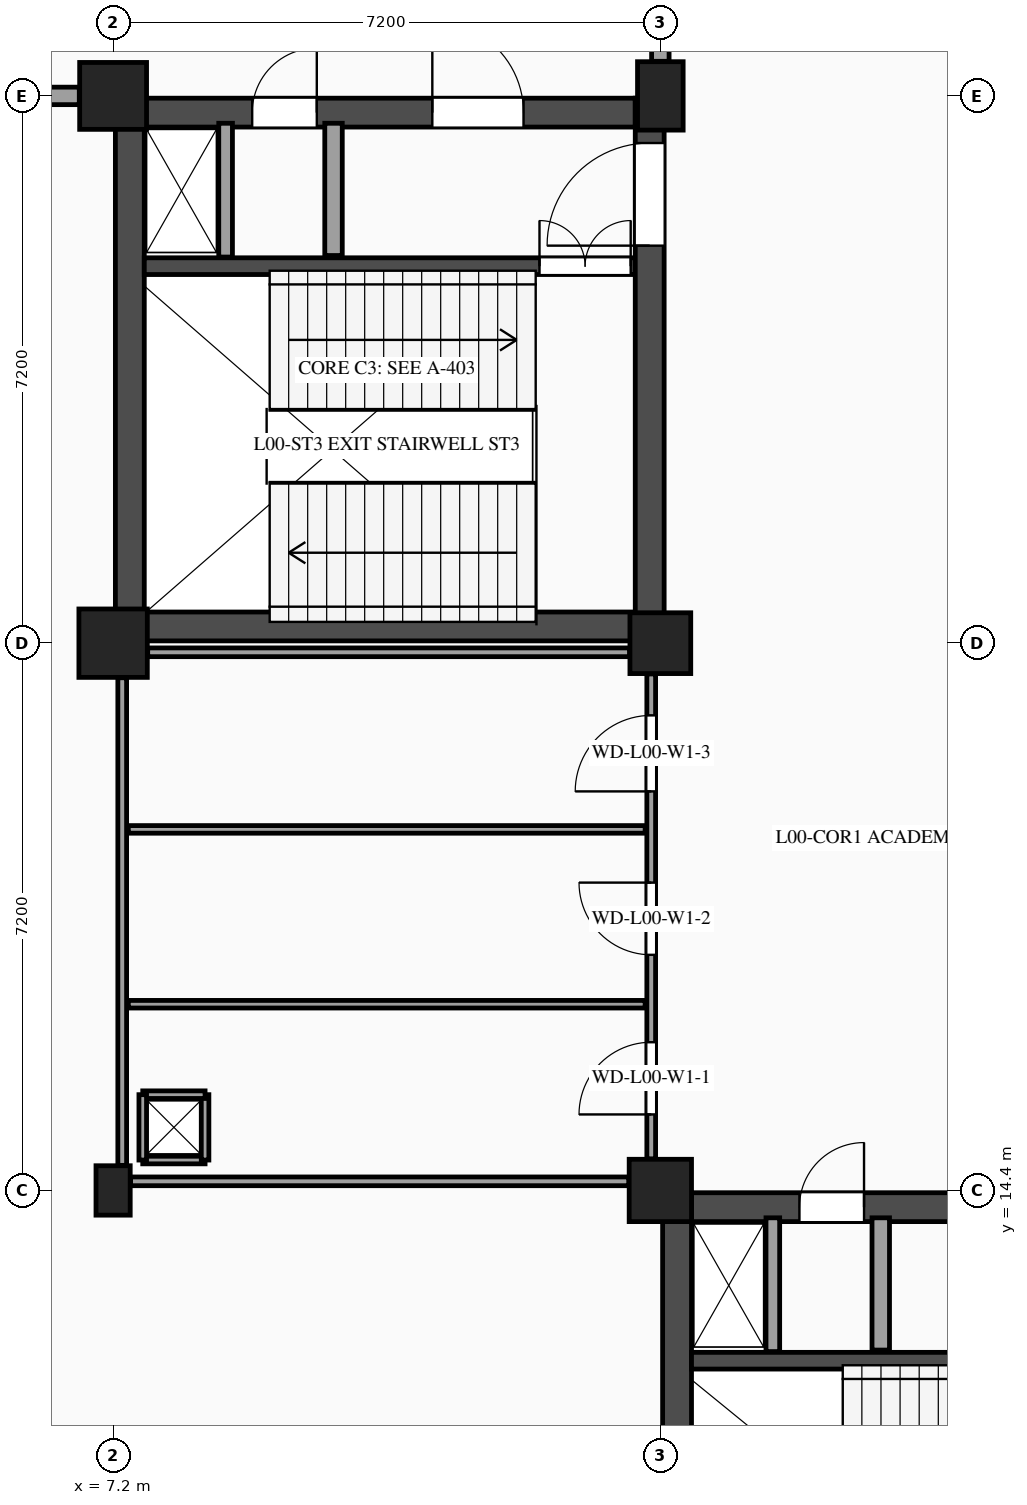
"""IFC4 building model, lengths in metres.
Left out: names, types, materials, properties, quantities, classifications, styles, units other than length and angle.
Written with IfcOpenShell. Run it as: python <this file> out.ifc"""

import sys

from ifc_helpers import new_model, si_unit, direction, frame, frame_2d, origin, origin_2d, place, context, subcontext, project, spatial, rectangle, extrude, element, fill, save


model = new_model("IFC4")
c1 = context("Model", 3, precision=1e-05, world=origin(), true_north=direction((0.0, 1.0)))
c2 = subcontext(c1, "Body", "Model", "MODEL_VIEW")
j1 = project(units=[si_unit("LENGTHUNIT", "METRE"), si_unit("PLANEANGLEUNIT", "RADIAN")], contexts=[c1])
p1 = place(None, origin())
s1 = spatial("IfcSite", under=j1, at=p1, CompositionType="ELEMENT")
p2 = place(p1, origin())
s2 = spatial("IfcBuilding", under=s1, at=p2, CompositionType="ELEMENT")
p3 = place(p2, origin())
s3 = spatial("IfcBuildingStorey", under=s2, at=p3, CompositionType="ELEMENT", Elevation=0.0)
p4 = place(p3, frame((7.2, 14.4, 0.0), z_axis=(0.0, 0.0, 1.0), x_axis=(1.0, 0.0, 0.0)))
e1 = element("IfcColumn", 1, at=p4, inside=s3, PredefinedType="PILASTER", context=c2, shape_type="SweptSolid", body=[
    extrude(rectangle(XDim=0.45, YDim=0.65, at=origin_2d()), origin(), (0.0, 0.0, 1.0), 5.4),
])
p5 = place(p3, frame((7.2, 21.6, 0.0), z_axis=(0.0, 0.0, 1.0), x_axis=(1.0, 0.0, 0.0)))
e2 = element("IfcColumn", 2, at=p5, inside=s3, PredefinedType="COLUMN", context=c2, shape_type="SweptSolid", body=[
    extrude(rectangle(XDim=0.9, YDim=0.9, at=origin_2d()), origin(), (0.0, 0.0, 1.0), 5.4),
])
p6 = place(p3, frame((7.2, 28.8, 0.0), z_axis=(0.0, 0.0, 1.0), x_axis=(1.0, 0.0, 0.0)))
e3 = element("IfcColumn", 3, at=p6, inside=s3, PredefinedType="COLUMN", context=c2, shape_type="SweptSolid", body=[
    extrude(rectangle(XDim=0.88, YDim=0.88, at=origin_2d()), origin(), (0.0, 0.0, 1.0), 5.4),
])
p7 = place(p3, frame((14.4, 14.4, 0.0), z_axis=(0.0, 0.0, 1.0), x_axis=(1.0, 0.0, 0.0)))
e4 = element("IfcColumn", 4, at=p7, inside=s3, PredefinedType="COLUMN", context=c2, shape_type="SweptSolid", body=[
    extrude(rectangle(XDim=0.82, YDim=0.82, at=origin_2d()), origin(), (0.0, 0.0, 1.0), 5.4),
])
p8 = place(p3, frame((14.4, 21.6, 0.0), z_axis=(0.0, 0.0, 1.0), x_axis=(1.0, 0.0, 0.0)))
e5 = element("IfcColumn", 5, at=p8, inside=s3, PredefinedType="COLUMN", context=c2, shape_type="SweptSolid", body=[
    extrude(rectangle(XDim=0.8, YDim=0.8, at=origin_2d()), origin(), (0.0, 0.0, 1.0), 5.4),
])
p9 = place(p3, frame((14.4, 28.8, 0.0), z_axis=(0.0, 0.0, 1.0), x_axis=(1.0, 0.0, 0.0)))
e6 = element("IfcColumn", 6, at=p9, inside=s3, PredefinedType="COLUMN", context=c2, shape_type="SweptSolid", body=[
    extrude(rectangle(XDim=0.6, YDim=0.9, at=origin_2d()), origin(), (0.0, 0.0, 1.0), 5.4),
])
p10 = place(p3, frame((14.62, 14.37, 0.0), z_axis=(0.0, 0.0, 1.0), x_axis=(0.0, -1.0, 0.0)))
e7 = element("IfcWall", 7, at=p10, inside=s3, PredefinedType="SHEAR", context=c2, shape_type="SweptSolid", body=[
    extrude(rectangle(XDim=7.14, YDim=0.38, at=frame_2d((3.57, 0.0))), origin(), (0.0, 0.0, 1.0), 5.09),
])
p11 = place(p3, frame((14.81, 14.18, 0.0), z_axis=(0.0, 0.0, 1.0), x_axis=(1.0, 0.0, 0.0)))
e8 = element("IfcWall", 8, at=p11, inside=s3, PredefinedType="SHEAR", context=c2, shape_type="SweptSolid", body=[
    extrude(rectangle(XDim=6.6, YDim=0.38, at=frame_2d((3.3, 0.0))), origin(), (0.0, 0.0, 1.0), 5.09),
])
p12 = place(p11, frame((1.42, 0.0, 0.0)))
e9 = element("IfcOpeningElement", 9, at=p12, cuts=e8, PredefinedType="OPENING", context=c2, shape_type="SweptSolid", body=[
    extrude(rectangle(XDim=0.85, YDim=2.1, at=frame_2d((0.425, 1.05))), frame((0.0, 0.2, 0.0), z_axis=(0.0, -1.0, 0.0), x_axis=(1.0, 0.0, 0.0)), (0.0, 0.0, 1.0), 0.4),
])
p13 = place(p11, frame((3.4, 0.0, 0.0)))
e10 = element("IfcOpeningElement", 10, at=p13, cuts=e8, PredefinedType="OPENING", context=c2, shape_type="SweptSolid", body=[
    extrude(rectangle(XDim=0.95, YDim=2.15, at=frame_2d((0.475, 1.075))), frame((0.0, 0.2, 0.0), z_axis=(0.0, -1.0, 0.0), x_axis=(1.0, 0.0, 0.0)), (0.0, 0.0, 1.0), 0.4),
])
p14 = place(p3, frame((14.81, 12.16, 0.0), z_axis=(0.0, 0.0, 1.0), x_axis=(1.0, 0.0, 0.0)))
e11 = element("IfcWall", 11, at=p14, inside=s3, PredefinedType="SHEAR", context=c2, shape_type="SweptSolid", body=[
    extrude(rectangle(XDim=6.6, YDim=0.22, at=frame_2d((3.3, 0.0))), origin(), (0.0, 0.0, 1.0), 5.09),
])
p15 = place(p3, frame((17.3, 12.3, 0.0), z_axis=(0.0, 0.0, 1.0), x_axis=(0.0, 1.0, 0.0)))
e12 = element("IfcWall", 12, at=p15, inside=s3, PredefinedType="PARTITIONING", context=c2, shape_type="SweptSolid", body=[
    extrude(rectangle(XDim=1.74, YDim=0.23, at=frame_2d((0.87, 0.0))), origin(), (0.0, 0.0, 1.0), 5.09),
])
p16 = place(p3, frame((15.88, 12.28, 0.0), z_axis=(0.0, 0.0, 1.0), x_axis=(0.0, 1.0, 0.0)))
e13 = element("IfcWall", 13, at=p16, inside=s3, PredefinedType="PARTITIONING", context=c2, shape_type="SweptSolid", body=[
    extrude(rectangle(XDim=1.76, YDim=0.18, at=frame_2d((0.88, 0.0))), origin(), (0.0, 0.0, 1.0), 5.09),
])
p17 = place(p3, frame((7.61, 21.82, 0.0), z_axis=(0.0, 0.0, 1.0), x_axis=(1.0, 0.0, 0.0)))
e14 = element("IfcWall", 14, at=p17, inside=s3, PredefinedType="SHEAR", context=c2, shape_type="SweptSolid", body=[
    extrude(rectangle(XDim=6.46, YDim=0.38, at=frame_2d((3.23, 0.0))), origin(), (0.0, 0.0, 1.0), 5.09),
])
p18 = place(p3, frame((7.42, 28.77, 0.0), z_axis=(0.0, 0.0, 1.0), x_axis=(0.0, -1.0, 0.0)))
e15 = element("IfcWall", 15, at=p18, inside=s3, PredefinedType="SHEAR", context=c2, shape_type="SweptSolid", body=[
    extrude(rectangle(XDim=7.14, YDim=0.38, at=frame_2d((3.57, 0.0))), origin(), (0.0, 0.0, 1.0), 5.09),
])
p19 = place(p3, frame((7.61, 28.58, 0.0), z_axis=(0.0, 0.0, 1.0), x_axis=(1.0, 0.0, 0.0)))
e16 = element("IfcWall", 16, at=p19, inside=s3, PredefinedType="SHEAR", context=c2, shape_type="SweptSolid", body=[
    extrude(rectangle(XDim=6.46, YDim=0.38, at=frame_2d((3.23, 0.0))), origin(), (0.0, 0.0, 1.0), 5.09),
])
p20 = place(p19, frame((1.42, 0.0, 0.0)))
e17 = element("IfcOpeningElement", 17, at=p20, cuts=e16, PredefinedType="OPENING", context=c2, shape_type="SweptSolid", body=[
    extrude(rectangle(XDim=0.85, YDim=2.1, at=frame_2d((0.425, 1.05))), frame((0.0, 0.2, 0.0), z_axis=(0.0, -1.0, 0.0), x_axis=(1.0, 0.0, 0.0)), (0.0, 0.0, 1.0), 0.4),
])
p21 = place(p19, frame((3.79, 0.0, 0.0)))
e18 = element("IfcOpeningElement", 18, at=p21, cuts=e16, PredefinedType="OPENING", context=c2, shape_type="SweptSolid", body=[
    extrude(rectangle(XDim=1.2, YDim=2.2, at=frame_2d((0.6, 1.1))), frame((0.0, 0.2, 0.0), z_axis=(0.0, -1.0, 0.0), x_axis=(1.0, 0.0, 0.0)), (0.0, 0.0, 1.0), 0.4),
])
p22 = place(p3, frame((7.61, 26.56, 0.0), z_axis=(0.0, 0.0, 1.0), x_axis=(1.0, 0.0, 0.0)))
e19 = element("IfcWall", 19, at=p22, inside=s3, PredefinedType="SHEAR", context=c2, shape_type="SweptSolid", body=[
    extrude(rectangle(XDim=6.46, YDim=0.22, at=frame_2d((3.23, 0.0))), origin(), (0.0, 0.0, 1.0), 5.09),
])
p23 = place(p22, frame((5.2, 0.0, 0.0)))
e20 = element("IfcOpeningElement", 20, at=p23, cuts=e19, PredefinedType="OPENING", context=c2, shape_type="SweptSolid", body=[
    extrude(rectangle(XDim=1.2, YDim=2.2, at=frame_2d((0.6, 1.1))), frame((0.0, 0.12, 0.0), z_axis=(0.0, -1.0, 0.0), x_axis=(1.0, 0.0, 0.0)), (0.0, 0.0, 1.0), 0.24),
])
p24 = place(p3, frame((10.1, 26.7, 0.0), z_axis=(0.0, 0.0, 1.0), x_axis=(0.0, 1.0, 0.0)))
e21 = element("IfcWall", 21, at=p24, inside=s3, PredefinedType="PARTITIONING", context=c2, shape_type="SweptSolid", body=[
    extrude(rectangle(XDim=1.74, YDim=0.23, at=frame_2d((0.87, 0.0))), origin(), (0.0, 0.0, 1.0), 5.09),
])
p25 = place(p3, frame((8.68, 26.68, 0.0), z_axis=(0.0, 0.0, 1.0), x_axis=(0.0, 1.0, 0.0)))
e22 = element("IfcWall", 22, at=p25, inside=s3, PredefinedType="PARTITIONING", context=c2, shape_type="SweptSolid", body=[
    extrude(rectangle(XDim=1.76, YDim=0.18, at=frame_2d((0.88, 0.0))), origin(), (0.0, 0.0, 1.0), 5.09),
])
p26 = place(p3, frame((14.26, 21.63, 0.0), z_axis=(0.0, 0.0, 1.0), x_axis=(0.0, 1.0, 0.0)))
e23 = element("IfcWall", 23, at=p26, inside=s3, PredefinedType="SHEAR", context=c2, shape_type="SweptSolid", body=[
    extrude(rectangle(XDim=7.14, YDim=0.38, at=frame_2d((3.57, 0.0))), origin(), (0.0, 0.0, 1.0), 5.09),
])
p27 = place(p26, frame((5.2, 0.0, 0.0)))
e24 = element("IfcOpeningElement", 24, at=p27, cuts=e23, PredefinedType="OPENING", context=c2, shape_type="SweptSolid", body=[
    extrude(rectangle(XDim=1.35, YDim=2.15, at=frame_2d((0.675, 1.075))), frame((0.0, 0.2, 0.0), z_axis=(0.0, -1.0, 0.0), x_axis=(1.0, 0.0, 0.0)), (0.0, 0.0, 1.0), 0.4),
])
p28 = place(p3, frame((7.43, 14.52, 0.0), z_axis=(0.0, 0.0, 1.0), x_axis=(1.0, 0.0, 0.0)))
e25 = element("IfcWall", 25, at=p28, inside=s3, PredefinedType="PARTITIONING", context=c2, shape_type="SweptSolid", body=[
    extrude(rectangle(XDim=6.555, YDim=0.115, at=frame_2d((3.278, 0.0))), origin(), (0.0, 0.0, 1.0), 4.34),
])
p29 = place(p3, frame((7.655, 21.48, 0.0), z_axis=(0.0, 0.0, 1.0), x_axis=(1.0, 0.0, 0.0)))
e26 = element("IfcWall", 26, at=p29, inside=s3, PredefinedType="PARTITIONING", context=c2, shape_type="SweptSolid", body=[
    extrude(rectangle(XDim=6.34, YDim=0.115, at=frame_2d((3.17, 0.0))), origin(), (0.0, 0.0, 1.0), 4.34),
])
p30 = place(p3, frame((7.32, 14.73, 0.0), z_axis=(0.0, 0.0, 1.0), x_axis=(0.0, 1.0, 0.0)))
e27 = element("IfcWall", 27, at=p30, inside=s3, PredefinedType="PARTITIONING", context=c2, shape_type="SweptSolid", body=[
    extrude(rectangle(XDim=6.415, YDim=0.115, at=frame_2d((3.208, 0.0))), origin(), (0.0, 0.0, 1.0), 4.405),
])
p31 = place(p3, frame((14.28, 14.815, 0.0), z_axis=(0.0, 0.0, 1.0), x_axis=(0.0, 1.0, 0.0)))
e28 = element("IfcWall", 28, at=p31, inside=s3, PredefinedType="PARTITIONING", context=c2, shape_type="SweptSolid", body=[
    extrude(rectangle(XDim=6.38, YDim=0.115, at=frame_2d((3.19, 0.0))), origin(), (0.0, 0.0, 1.0), 4.405),
])
p32 = place(p31, frame((0.585, 0.0, 0.0)))
e29 = element("IfcOpeningElement", 29, at=p32, cuts=e28, PredefinedType="OPENING", context=c2, shape_type="SweptSolid", body=[
    extrude(rectangle(XDim=0.95, YDim=2.1, at=frame_2d((0.475, 1.05))), frame((0.0, 0.067, 0.0), z_axis=(0.0, -1.0, 0.0), x_axis=(1.0, 0.0, 0.0)), (0.0, 0.0, 1.0), 0.135),
])
p33 = place(p31, frame((2.685, 0.0, 0.0)))
e30 = element("IfcOpeningElement", 30, at=p33, cuts=e28, PredefinedType="OPENING", context=c2, shape_type="SweptSolid", body=[
    extrude(rectangle(XDim=0.95, YDim=2.1, at=frame_2d((0.475, 1.05))), frame((0.0, 0.067, 0.0), z_axis=(0.0, -1.0, 0.0), x_axis=(1.0, 0.0, 0.0)), (0.0, 0.0, 1.0), 0.135),
])
p34 = place(p31, frame((4.835, 0.0, 0.0)))
e31 = element("IfcOpeningElement", 31, at=p34, cuts=e28, PredefinedType="OPENING", context=c2, shape_type="SweptSolid", body=[
    extrude(rectangle(XDim=1.0, YDim=2.15, at=frame_2d((0.5, 1.075))), frame((0.0, 0.067, 0.0), z_axis=(0.0, -1.0, 0.0), x_axis=(1.0, 0.0, 0.0)), (0.0, 0.0, 1.0), 0.135),
])
for number, where, z_axis, x_axis in (
    (32, (7.4, 16.85, 0.0), (0.0, 0.0, 1.0), (1.0, 0.0, 0.0)),
    (33, (7.4, 19.15, 0.0), (0.0, 0.0, 1.0), (1.0, 0.0, 0.0)),
):
    element("IfcWall", number, at=place(p3, frame(where, z_axis=z_axis, x_axis=x_axis)), inside=s3, PredefinedType="PARTITIONING", context=c2, shape_type="SweptSolid", body=[
        extrude(rectangle(XDim=6.8, YDim=0.1, at=frame_2d((3.4, 0.0))), origin(), (0.0, 0.0, 1.0), 5.09),
    ])
p35 = place(p3, frame((7.59, 14.8, 0.0), z_axis=(0.0, 0.0, 1.0), x_axis=(1.0, 0.0, 0.0)))
e34 = element("IfcWall", 34, at=p35, inside=s3, PredefinedType="PARTITIONING", context=c2, shape_type="SweptSolid", body=[
    extrude(rectangle(XDim=0.82, YDim=0.1, at=frame_2d((0.41, 0.0))), origin(), (0.0, 0.0, 1.0), 5.09),
])
p36 = place(p3, frame((8.41, 14.8, 0.0), z_axis=(0.0, 0.0, 1.0), x_axis=(0.0, 1.0, 0.0)))
e35 = element("IfcWall", 35, at=p36, inside=s3, PredefinedType="PARTITIONING", context=c2, shape_type="SweptSolid", body=[
    extrude(rectangle(XDim=0.86, YDim=0.1, at=frame_2d((0.43, 0.0))), origin(), (0.0, 0.0, 1.0), 5.09),
])
p37 = place(p3, frame((8.41, 15.66, 0.0), z_axis=(0.0, 0.0, 1.0), x_axis=(-1.0, 0.0, 0.0)))
e36 = element("IfcWall", 36, at=p37, inside=s3, PredefinedType="PARTITIONING", context=c2, shape_type="SweptSolid", body=[
    extrude(rectangle(XDim=0.82, YDim=0.1, at=frame_2d((0.41, 0.0))), origin(), (0.0, 0.0, 1.0), 5.09),
])
p38 = place(p3, frame((7.59, 15.66, 0.0), z_axis=(0.0, 0.0, 1.0), x_axis=(0.0, -1.0, 0.0)))
e37 = element("IfcWall", 37, at=p38, inside=s3, PredefinedType="PARTITIONING", context=c2, shape_type="SweptSolid", body=[
    extrude(rectangle(XDim=0.86, YDim=0.1, at=frame_2d((0.43, 0.0))), origin(), (0.0, 0.0, 1.0), 5.09),
])
p39 = place(p3, frame((0.305, 28.8, 0.0), z_axis=(0.0, 0.0, 1.0), x_axis=(1.0, 0.0, 0.0)))
e38 = element("IfcWall", 38, at=p39, inside=s3, PredefinedType="PARTITIONING", context=c2, shape_type="SweptSolid", body=[
    extrude(rectangle(XDim=6.45, YDim=0.23, at=frame_2d((3.225, 0.0))), origin(), (0.0, 0.0, 1.0), 4.31),
])
p40 = place(p3, frame((14.4, 29.255, 0.0), z_axis=(0.0, 0.0, 1.0), x_axis=(0.0, 1.0, 0.0)))
e39 = element("IfcWall", 39, at=p40, inside=s3, PredefinedType="PARTITIONING", context=c2, shape_type="SweptSolid", body=[
    extrude(rectangle(XDim=6.415, YDim=0.23, at=frame_2d((3.208, 0.0))), origin(), (0.0, 0.0, 1.0), 4.395),
])
p41 = place(p12, origin())
e40 = element("IfcDoor", 40, at=p41, inside=s3, OperationType="SINGLE_SWING_RIGHT", PredefinedType="DOOR", context=c2, shape_type="SweptSolid", body=[
    extrude(rectangle(XDim=0.85, YDim=2.1, at=frame_2d((0.425, 1.05))), frame((0.0, 0.025, 0.0), z_axis=(0.0, -1.0, 0.0), x_axis=(1.0, 0.0, 0.0)), (0.0, 0.0, 1.0), 0.05),
])
fill(e9, e40)
p42 = place(p20, origin())
e41 = element("IfcDoor", 41, at=p42, inside=s3, OperationType="SINGLE_SWING_RIGHT", PredefinedType="DOOR", context=c2, shape_type="SweptSolid", body=[
    extrude(rectangle(XDim=0.85, YDim=2.1, at=frame_2d((0.425, 1.05))), frame((0.0, 0.025, 0.0), z_axis=(0.0, -1.0, 0.0), x_axis=(1.0, 0.0, 0.0)), (0.0, 0.0, 1.0), 0.05),
])
fill(e17, e41)
p43 = place(p21, origin())
e42 = element("IfcDoor", 42, at=p43, inside=s3, OperationType="SINGLE_SWING_LEFT", PredefinedType="DOOR", context=c2, shape_type="SweptSolid", body=[
    extrude(rectangle(XDim=1.2, YDim=2.2, at=frame_2d((0.6, 1.1))), frame((0.0, 0.025, 0.0), z_axis=(0.0, -1.0, 0.0), x_axis=(1.0, 0.0, 0.0)), (0.0, 0.0, 1.0), 0.05),
])
fill(e18, e42)
p44 = place(p23, frame((1.2, 0.0, 0.0), z_axis=(0.0, 0.0, 1.0), x_axis=(-1.0, 0.0, 0.0)))
e43 = element("IfcDoor", 43, at=p44, inside=s3, OperationType="DOUBLE_DOOR_SINGLE_SWING", PredefinedType="DOOR", context=c2, shape_type="SweptSolid", body=[
    extrude(rectangle(XDim=1.2, YDim=2.2, at=frame_2d((0.6, 1.1))), frame((0.0, 0.025, 0.0), z_axis=(0.0, -1.0, 0.0), x_axis=(1.0, 0.0, 0.0)), (0.0, 0.0, 1.0), 0.05),
])
fill(e20, e43)
p45 = place(p27, frame((1.35, 0.0, 0.0), z_axis=(0.0, 0.0, 1.0), x_axis=(-1.0, 0.0, 0.0)))
e44 = element("IfcDoor", 44, at=p45, inside=s3, OperationType="SINGLE_SWING_LEFT", PredefinedType="DOOR", context=c2, shape_type="SweptSolid", body=[
    extrude(rectangle(XDim=1.35, YDim=2.15, at=frame_2d((0.675, 1.075))), frame((0.0, 0.025, 0.0), z_axis=(0.0, -1.0, 0.0), x_axis=(1.0, 0.0, 0.0)), (0.0, 0.0, 1.0), 0.05),
])
fill(e24, e44)
p46 = place(p32, origin())
e45 = element("IfcDoor", 45, at=p46, inside=s3, OperationType="SINGLE_SWING_LEFT", PredefinedType="DOOR", context=c2, shape_type="SweptSolid", body=[
    extrude(rectangle(XDim=0.95, YDim=2.1, at=frame_2d((0.475, 1.05))), frame((0.0, 0.025, 0.0), z_axis=(0.0, -1.0, 0.0), x_axis=(1.0, 0.0, 0.0)), (0.0, 0.0, 1.0), 0.05),
])
fill(e29, e45)
p47 = place(p33, origin())
e46 = element("IfcDoor", 46, at=p47, inside=s3, OperationType="SINGLE_SWING_RIGHT", PredefinedType="DOOR", context=c2, shape_type="SweptSolid", body=[
    extrude(rectangle(XDim=0.95, YDim=2.1, at=frame_2d((0.475, 1.05))), frame((0.0, 0.025, 0.0), z_axis=(0.0, -1.0, 0.0), x_axis=(1.0, 0.0, 0.0)), (0.0, 0.0, 1.0), 0.05),
])
fill(e30, e46)
p48 = place(p34, origin())
e47 = element("IfcDoor", 47, at=p48, inside=s3, OperationType="SINGLE_SWING_LEFT", PredefinedType="DOOR", context=c2, shape_type="SweptSolid", body=[
    extrude(rectangle(XDim=1.0, YDim=2.15, at=frame_2d((0.5, 1.075))), frame((0.0, 0.025, 0.0), z_axis=(0.0, -1.0, 0.0), x_axis=(1.0, 0.0, 0.0)), (0.0, 0.0, 1.0), 0.05),
])
fill(e31, e47)
save(model, sys.argv[1])
